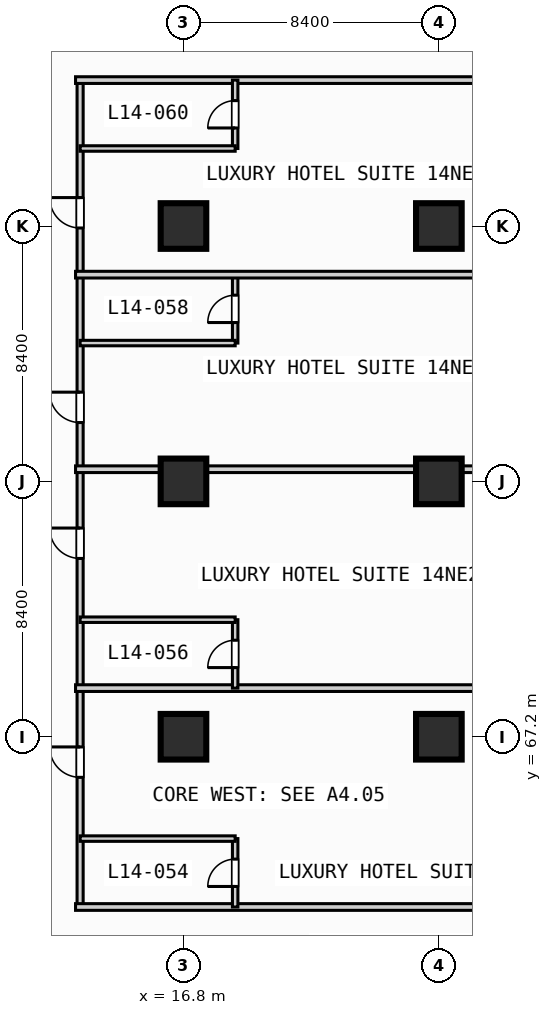
"""IFC4 building model, lengths in metres.
Left out: names, types, materials, properties, quantities, classifications, styles, units other than length and angle.
Written with IfcOpenShell. Run it as: python <this file> out.ifc"""

import sys

from ifc_helpers import new_model, si_unit, direction, frame, frame_2d, origin, origin_2d, place, context, subcontext, project, spatial, rectangle, extrude, element, fill, save


model = new_model("IFC4")
c1 = context("Model", 3, precision=1e-05, world=origin(), true_north=direction((0.0, 1.0)))
c2 = subcontext(c1, "Body", "Model", "MODEL_VIEW")
j1 = project(units=[si_unit("LENGTHUNIT", "METRE"), si_unit("PLANEANGLEUNIT", "RADIAN")], contexts=[c1])
p1 = place(None, origin())
s1 = spatial("IfcSite", under=j1, at=p1, CompositionType="ELEMENT")
p2 = place(p1, origin())
s2 = spatial("IfcBuilding", under=s1, at=p2, CompositionType="ELEMENT")
p3 = place(p2, frame((0.0, 0.0, 62.4)))
s3 = spatial("IfcBuildingStorey", under=s2, at=p3, CompositionType="ELEMENT", Elevation=62.4)
for number, where, z_axis, x_axis in (
    (1, (16.8, 67.2, 0.0), (0.0, 0.0, 1.0), (1.0, 0.0, 0.0)),
    (2, (16.8, 75.6, 0.0), (0.0, 0.0, 1.0), (1.0, 0.0, 0.0)),
    (3, (16.8, 84.0, 0.0), (0.0, 0.0, 1.0), (1.0, 0.0, 0.0)),
    (4, (25.2, 67.2, 0.0), (0.0, 0.0, 1.0), (1.0, 0.0, 0.0)),
    (5, (25.2, 75.6, 0.0), (0.0, 0.0, 1.0), (1.0, 0.0, 0.0)),
    (6, (25.2, 84.0, 0.0), (0.0, 0.0, 1.0), (1.0, 0.0, 0.0)),
):
    element("IfcColumn", number, at=place(p3, frame(where, z_axis=z_axis, x_axis=x_axis)), inside=s3, PredefinedType="COLUMN", context=c2, shape_type="SweptSolid", body=[
        extrude(rectangle(XDim=1.5, YDim=1.5, at=origin_2d()), origin(), (0.0, 0.0, 1.0), 3.8),
    ])
p4 = place(p3, frame((13.4, 61.6, 0.0), z_axis=(0.0, 0.0, 1.0), x_axis=(0.0, 1.0, 0.0)))
e7 = element("IfcWall", 7, at=p4, inside=s3, PredefinedType="PARTITIONING", context=c2, shape_type="SweptSolid", body=[
    extrude(rectangle(XDim=27.2, YDim=0.2, at=frame_2d((13.6, 0.0))), origin(), (0.0, 0.0, 1.0), 3.55),
])
p5 = place(p4, frame((4.265, 0.0, 0.0)))
e8 = element("IfcOpeningElement", 8, at=p5, cuts=e7, PredefinedType="OPENING", context=c2, shape_type="SweptSolid", body=[
    extrude(rectangle(XDim=1.0, YDim=2.15, at=frame_2d((0.5, 1.075))), frame((0.0, 0.11, 0.0), z_axis=(0.0, -1.0, 0.0), x_axis=(1.0, 0.0, 0.0)), (0.0, 0.0, 1.0), 0.22),
])
p6 = place(p4, frame((11.465, 0.0, 0.0)))
e9 = element("IfcOpeningElement", 9, at=p6, cuts=e7, PredefinedType="OPENING", context=c2, shape_type="SweptSolid", body=[
    extrude(rectangle(XDim=1.0, YDim=2.15, at=frame_2d((0.5, 1.075))), frame((0.0, 0.11, 0.0), z_axis=(0.0, -1.0, 0.0), x_axis=(1.0, 0.0, 0.0)), (0.0, 0.0, 1.0), 0.22),
])
p7 = place(p4, frame((15.935, 0.0, 0.0)))
e10 = element("IfcOpeningElement", 10, at=p7, cuts=e7, PredefinedType="OPENING", context=c2, shape_type="SweptSolid", body=[
    extrude(rectangle(XDim=1.0, YDim=2.15, at=frame_2d((0.5, 1.075))), frame((0.0, 0.11, 0.0), z_axis=(0.0, -1.0, 0.0), x_axis=(1.0, 0.0, 0.0)), (0.0, 0.0, 1.0), 0.22),
])
p8 = place(p4, frame((22.335, 0.0, 0.0)))
e11 = element("IfcOpeningElement", 11, at=p8, cuts=e7, PredefinedType="OPENING", context=c2, shape_type="SweptSolid", body=[
    extrude(rectangle(XDim=1.0, YDim=2.15, at=frame_2d((0.5, 1.075))), frame((0.0, 0.11, 0.0), z_axis=(0.0, -1.0, 0.0), x_axis=(1.0, 0.0, 0.0)), (0.0, 0.0, 1.0), 0.22),
])
p9 = place(p3, frame((13.25, 61.6, 0.0), z_axis=(0.0, 0.0, 1.0), x_axis=(1.0, 0.0, 0.0)))
e12 = element("IfcWall", 12, at=p9, inside=s3, PredefinedType="PARTITIONING", context=c2, shape_type="SweptSolid", body=[
    extrude(rectangle(XDim=20.18, YDim=0.22, at=frame_2d((10.09, 0.0))), origin(), (0.0, 0.0, 1.0), 3.55),
])
p10 = place(p3, frame((18.5, 61.6, 0.0), z_axis=(0.0, 0.0, 1.0), x_axis=(0.0, 1.0, 0.0)))
e13 = element("IfcWall", 13, at=p10, inside=s3, PredefinedType="PLUMBINGWALL", context=c2, shape_type="SweptSolid", body=[
    extrude(rectangle(XDim=2.25, YDim=0.18, at=frame_2d((1.125, 0.0))), origin(), (0.0, 0.0, 1.0), 3.55),
])
p11 = place(p10, frame((0.675, 0.0, 0.0)))
e14 = element("IfcOpeningElement", 14, at=p11, cuts=e13, PredefinedType="OPENING", context=c2, shape_type="SweptSolid", body=[
    extrude(rectangle(XDim=0.9, YDim=2.1, at=frame_2d((0.45, 1.05))), frame((0.0, 0.1, 0.0), z_axis=(0.0, -1.0, 0.0), x_axis=(1.0, 0.0, 0.0)), (0.0, 0.0, 1.0), 0.2),
])
p12 = place(p3, frame((13.4, 63.85, 0.0), z_axis=(0.0, 0.0, 1.0), x_axis=(1.0, 0.0, 0.0)))
e15 = element("IfcWall", 15, at=p12, inside=s3, PredefinedType="PLUMBINGWALL", context=c2, shape_type="SweptSolid", body=[
    extrude(rectangle(XDim=5.1, YDim=0.18, at=frame_2d((2.55, 0.0))), origin(), (0.0, 0.0, 1.0), 3.55),
])
p13 = place(p3, frame((13.25, 68.8, 0.0), z_axis=(0.0, 0.0, 1.0), x_axis=(1.0, 0.0, 0.0)))
e16 = element("IfcWall", 16, at=p13, inside=s3, PredefinedType="PARTITIONING", context=c2, shape_type="SweptSolid", body=[
    extrude(rectangle(XDim=20.18, YDim=0.22, at=frame_2d((10.09, 0.0))), origin(), (0.0, 0.0, 1.0), 3.55),
])
p14 = place(p3, frame((18.5, 68.8, 0.0), z_axis=(0.0, 0.0, 1.0), x_axis=(0.0, 1.0, 0.0)))
e17 = element("IfcWall", 17, at=p14, inside=s3, PredefinedType="PLUMBINGWALL", context=c2, shape_type="SweptSolid", body=[
    extrude(rectangle(XDim=2.25, YDim=0.18, at=frame_2d((1.125, 0.0))), origin(), (0.0, 0.0, 1.0), 3.55),
])
p15 = place(p14, frame((0.675, 0.0, 0.0)))
e18 = element("IfcOpeningElement", 18, at=p15, cuts=e17, PredefinedType="OPENING", context=c2, shape_type="SweptSolid", body=[
    extrude(rectangle(XDim=0.9, YDim=2.1, at=frame_2d((0.45, 1.05))), frame((0.0, 0.1, 0.0), z_axis=(0.0, -1.0, 0.0), x_axis=(1.0, 0.0, 0.0)), (0.0, 0.0, 1.0), 0.2),
])
p16 = place(p3, frame((13.4, 71.05, 0.0), z_axis=(0.0, 0.0, 1.0), x_axis=(1.0, 0.0, 0.0)))
e19 = element("IfcWall", 19, at=p16, inside=s3, PredefinedType="PLUMBINGWALL", context=c2, shape_type="SweptSolid", body=[
    extrude(rectangle(XDim=5.1, YDim=0.18, at=frame_2d((2.55, 0.0))), origin(), (0.0, 0.0, 1.0), 3.55),
])
p17 = place(p3, frame((13.25, 76.0, 0.0), z_axis=(0.0, 0.0, 1.0), x_axis=(1.0, 0.0, 0.0)))
e20 = element("IfcWall", 20, at=p17, inside=s3, PredefinedType="PARTITIONING", context=c2, shape_type="SweptSolid", body=[
    extrude(rectangle(XDim=20.18, YDim=0.22, at=frame_2d((10.09, 0.0))), origin(), (0.0, 0.0, 1.0), 3.55),
])
p18 = place(p3, frame((18.5, 80.15, 0.0), z_axis=(0.0, 0.0, 1.0), x_axis=(0.0, 1.0, 0.0)))
e21 = element("IfcWall", 21, at=p18, inside=s3, PredefinedType="PLUMBINGWALL", context=c2, shape_type="SweptSolid", body=[
    extrude(rectangle(XDim=2.25, YDim=0.18, at=frame_2d((1.125, 0.0))), origin(), (0.0, 0.0, 1.0), 3.55),
])
p19 = place(p18, frame((0.675, 0.0, 0.0)))
e22 = element("IfcOpeningElement", 22, at=p19, cuts=e21, PredefinedType="OPENING", context=c2, shape_type="SweptSolid", body=[
    extrude(rectangle(XDim=0.9, YDim=2.1, at=frame_2d((0.45, 1.05))), frame((0.0, 0.1, 0.0), z_axis=(0.0, -1.0, 0.0), x_axis=(1.0, 0.0, 0.0)), (0.0, 0.0, 1.0), 0.2),
])
p20 = place(p3, frame((13.4, 80.15, 0.0), z_axis=(0.0, 0.0, 1.0), x_axis=(1.0, 0.0, 0.0)))
e23 = element("IfcWall", 23, at=p20, inside=s3, PredefinedType="PLUMBINGWALL", context=c2, shape_type="SweptSolid", body=[
    extrude(rectangle(XDim=5.1, YDim=0.18, at=frame_2d((2.55, 0.0))), origin(), (0.0, 0.0, 1.0), 3.55),
])
for number, where, z_axis, x_axis in (
    (24, (13.25, 82.4, 0.0), (0.0, 0.0, 1.0), (1.0, 0.0, 0.0)),
    (25, (13.25, 88.8, 0.0), (0.0, 0.0, 1.0), (1.0, 0.0, 0.0)),
):
    element("IfcWall", number, at=place(p3, frame(where, z_axis=z_axis, x_axis=x_axis)), inside=s3, PredefinedType="PARTITIONING", context=c2, shape_type="SweptSolid", body=[
        extrude(rectangle(XDim=20.18, YDim=0.22, at=frame_2d((10.09, 0.0))), origin(), (0.0, 0.0, 1.0), 3.55),
    ])
p21 = place(p3, frame((18.5, 86.55, 0.0), z_axis=(0.0, 0.0, 1.0), x_axis=(0.0, 1.0, 0.0)))
e26 = element("IfcWall", 26, at=p21, inside=s3, PredefinedType="PLUMBINGWALL", context=c2, shape_type="SweptSolid", body=[
    extrude(rectangle(XDim=2.25, YDim=0.18, at=frame_2d((1.125, 0.0))), origin(), (0.0, 0.0, 1.0), 3.55),
])
p22 = place(p21, frame((0.675, 0.0, 0.0)))
e27 = element("IfcOpeningElement", 27, at=p22, cuts=e26, PredefinedType="OPENING", context=c2, shape_type="SweptSolid", body=[
    extrude(rectangle(XDim=0.9, YDim=2.1, at=frame_2d((0.45, 1.05))), frame((0.0, 0.1, 0.0), z_axis=(0.0, -1.0, 0.0), x_axis=(1.0, 0.0, 0.0)), (0.0, 0.0, 1.0), 0.2),
])
p23 = place(p3, frame((13.4, 86.55, 0.0), z_axis=(0.0, 0.0, 1.0), x_axis=(1.0, 0.0, 0.0)))
e28 = element("IfcWall", 28, at=p23, inside=s3, PredefinedType="PLUMBINGWALL", context=c2, shape_type="SweptSolid", body=[
    extrude(rectangle(XDim=5.1, YDim=0.18, at=frame_2d((2.55, 0.0))), origin(), (0.0, 0.0, 1.0), 3.55),
])
p24 = place(p5, origin())
e29 = element("IfcDoor", 29, at=p24, inside=s3, OperationType="SINGLE_SWING_RIGHT", PredefinedType="DOOR", context=c2, shape_type="SweptSolid", body=[
    extrude(rectangle(XDim=1.0, YDim=2.15, at=frame_2d((0.5, 1.075))), frame((0.0, 0.025, 0.0), z_axis=(0.0, -1.0, 0.0), x_axis=(1.0, 0.0, 0.0)), (0.0, 0.0, 1.0), 0.05),
])
fill(e8, e29)
p25 = place(p6, origin())
e30 = element("IfcDoor", 30, at=p25, inside=s3, OperationType="SINGLE_SWING_RIGHT", PredefinedType="DOOR", context=c2, shape_type="SweptSolid", body=[
    extrude(rectangle(XDim=1.0, YDim=2.15, at=frame_2d((0.5, 1.075))), frame((0.0, 0.025, 0.0), z_axis=(0.0, -1.0, 0.0), x_axis=(1.0, 0.0, 0.0)), (0.0, 0.0, 1.0), 0.05),
])
fill(e9, e30)
p26 = place(p7, origin())
e31 = element("IfcDoor", 31, at=p26, inside=s3, OperationType="SINGLE_SWING_RIGHT", PredefinedType="DOOR", context=c2, shape_type="SweptSolid", body=[
    extrude(rectangle(XDim=1.0, YDim=2.15, at=frame_2d((0.5, 1.075))), frame((0.0, 0.025, 0.0), z_axis=(0.0, -1.0, 0.0), x_axis=(1.0, 0.0, 0.0)), (0.0, 0.0, 1.0), 0.05),
])
fill(e10, e31)
p27 = place(p8, origin())
e32 = element("IfcDoor", 32, at=p27, inside=s3, OperationType="SINGLE_SWING_RIGHT", PredefinedType="DOOR", context=c2, shape_type="SweptSolid", body=[
    extrude(rectangle(XDim=1.0, YDim=2.15, at=frame_2d((0.5, 1.075))), frame((0.0, 0.025, 0.0), z_axis=(0.0, -1.0, 0.0), x_axis=(1.0, 0.0, 0.0)), (0.0, 0.0, 1.0), 0.05),
])
fill(e11, e32)
p28 = place(p11, origin())
e33 = element("IfcDoor", 33, at=p28, inside=s3, OperationType="SINGLE_SWING_LEFT", PredefinedType="DOOR", context=c2, shape_type="SweptSolid", body=[
    extrude(rectangle(XDim=0.9, YDim=2.1, at=frame_2d((0.45, 1.05))), frame((0.0, 0.025, 0.0), z_axis=(0.0, -1.0, 0.0), x_axis=(1.0, 0.0, 0.0)), (0.0, 0.0, 1.0), 0.05),
])
fill(e14, e33)
p29 = place(p15, origin())
e34 = element("IfcDoor", 34, at=p29, inside=s3, OperationType="SINGLE_SWING_LEFT", PredefinedType="DOOR", context=c2, shape_type="SweptSolid", body=[
    extrude(rectangle(XDim=0.9, YDim=2.1, at=frame_2d((0.45, 1.05))), frame((0.0, 0.025, 0.0), z_axis=(0.0, -1.0, 0.0), x_axis=(1.0, 0.0, 0.0)), (0.0, 0.0, 1.0), 0.05),
])
fill(e18, e34)
p30 = place(p19, origin())
e35 = element("IfcDoor", 35, at=p30, inside=s3, OperationType="SINGLE_SWING_LEFT", PredefinedType="DOOR", context=c2, shape_type="SweptSolid", body=[
    extrude(rectangle(XDim=0.9, YDim=2.1, at=frame_2d((0.45, 1.05))), frame((0.0, 0.025, 0.0), z_axis=(0.0, -1.0, 0.0), x_axis=(1.0, 0.0, 0.0)), (0.0, 0.0, 1.0), 0.05),
])
fill(e22, e35)
p31 = place(p22, origin())
e36 = element("IfcDoor", 36, at=p31, inside=s3, OperationType="SINGLE_SWING_LEFT", PredefinedType="DOOR", context=c2, shape_type="SweptSolid", body=[
    extrude(rectangle(XDim=0.9, YDim=2.1, at=frame_2d((0.45, 1.05))), frame((0.0, 0.025, 0.0), z_axis=(0.0, -1.0, 0.0), x_axis=(1.0, 0.0, 0.0)), (0.0, 0.0, 1.0), 0.05),
])
fill(e27, e36)
save(model, sys.argv[1])
